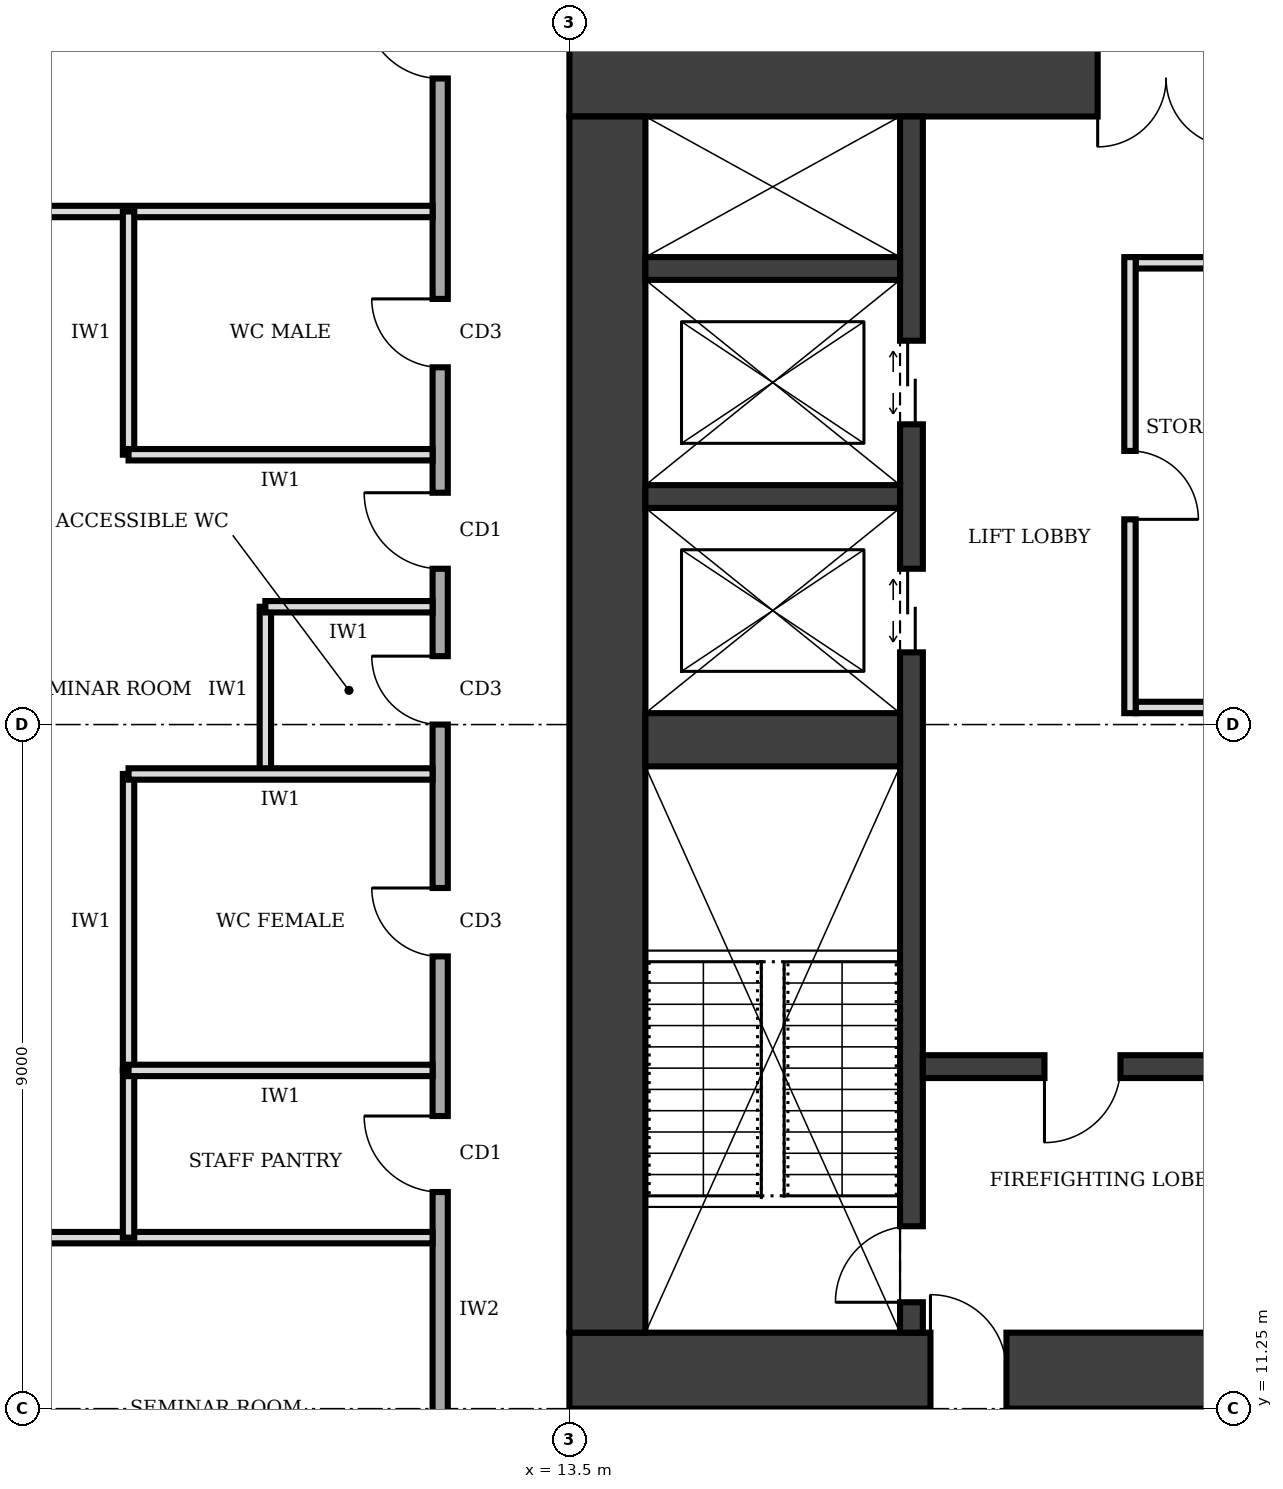
"""IFC4 building model, lengths in metres.
Left out: names, types, materials, properties, quantities, classifications, styles, units other than length and angle.
Written with IfcOpenShell. Run it as: python <this file> out.ifc"""

import sys

from ifc_helpers import new_model, si_unit, direction, frame, frame_2d, origin, place, context, subcontext, project, spatial, rectangle, extrude, element, fill, save


model = new_model("IFC4")
c1 = context("Model", 3, precision=1e-05, world=origin(), true_north=direction((0.0, 1.0)))
c2 = subcontext(c1, "Body", "Model", "MODEL_VIEW")
j1 = project(units=[si_unit("LENGTHUNIT", "METRE"), si_unit("PLANEANGLEUNIT", "RADIAN")], contexts=[c1])
p1 = place(None, origin())
s1 = spatial("IfcSite", under=j1, at=p1, CompositionType="ELEMENT")
p2 = place(p1, origin())
s2 = spatial("IfcBuilding", under=s1, at=p2, CompositionType="ELEMENT")
p3 = place(p2, frame((0.0, 0.0, 25.0)))
s3 = spatial("IfcBuildingStorey", under=s2, at=p3, CompositionType="ELEMENT", Elevation=25.0)
p4 = place(p3, frame((13.5, 11.75, 0.0), z_axis=(0.0, 0.0, 1.0), x_axis=(1.0, 0.0, 0.0)))
e1 = element("IfcWall", 1, at=p4, inside=s3, PredefinedType="SHEAR", context=c2, shape_type="SweptSolid", body=[
    extrude(rectangle(XDim=13.5, YDim=1.0, at=frame_2d((6.75, 0.0))), origin(), (0.0, 0.0, 1.0), 4.0),
])
p5 = place(p4, frame((4.75, 0.0, 0.0)))
e2 = element("IfcOpeningElement", 2, at=p5, cuts=e1, PredefinedType="OPENING", context=c2, shape_type="SweptSolid", body=[
    extrude(rectangle(XDim=1.0, YDim=2.1, at=frame_2d((0.5, 1.05))), frame((0.0, 0.51, 0.0), z_axis=(0.0, -1.0, 0.0), x_axis=(1.0, 0.0, 0.0)), (0.0, 0.0, 1.0), 1.02),
])
p6 = place(p3, frame((27.0, 28.75, 0.0), z_axis=(0.0, 0.0, 1.0), x_axis=(-1.0, 0.0, 0.0)))
e3 = element("IfcWall", 3, at=p6, inside=s3, PredefinedType="SHEAR", context=c2, shape_type="SweptSolid", body=[
    extrude(rectangle(XDim=13.5, YDim=1.0, at=frame_2d((6.75, 0.0))), origin(), (0.0, 0.0, 1.0), 4.0),
])
p7 = place(p6, frame((4.75, 0.0, 0.0)))
e4 = element("IfcOpeningElement", 4, at=p7, cuts=e3, PredefinedType="OPENING", context=c2, shape_type="SweptSolid", body=[
    extrude(rectangle(XDim=1.8, YDim=2.1, at=frame_2d((0.9, 1.05))), frame((0.0, 0.51, 0.0), z_axis=(0.0, -1.0, 0.0), x_axis=(1.0, 0.0, 0.0)), (0.0, 0.0, 1.0), 1.02),
])
p8 = place(p3, frame((14.0, 28.25, 0.0), z_axis=(0.0, 0.0, 1.0), x_axis=(0.0, -1.0, 0.0)))
e5 = element("IfcWall", 5, at=p8, inside=s3, PredefinedType="SHEAR", context=c2, shape_type="SweptSolid", body=[
    extrude(rectangle(XDim=16.0, YDim=1.0, at=frame_2d((8.0, 0.0))), origin(), (0.0, 0.0, 1.0), 4.0),
])
p9 = place(p3, frame((18.0, 12.25, 0.0), z_axis=(0.0, 0.0, 1.0), x_axis=(0.0, 1.0, 0.0)))
e6 = element("IfcWall", 6, at=p9, inside=s3, PredefinedType="SHEAR", context=c2, shape_type="SweptSolid", body=[
    extrude(rectangle(XDim=16.0, YDim=0.3, at=frame_2d((8.0, 0.0))), origin(), (0.0, 0.0, 1.0), 4.0),
])
p10 = place(p9, frame((0.4, 0.0, 0.0)))
e7 = element("IfcOpeningElement", 7, at=p10, cuts=e6, PredefinedType="OPENING", context=c2, shape_type="SweptSolid", body=[
    extrude(rectangle(XDim=1.0, YDim=2.1, at=frame_2d((0.5, 1.05))), frame((0.0, 0.16, 0.0), z_axis=(0.0, -1.0, 0.0), x_axis=(1.0, 0.0, 0.0)), (0.0, 0.0, 1.0), 0.32),
])
p11 = place(p9, frame((8.95, 0.0, 0.0)))
e8 = element("IfcOpeningElement", 8, at=p11, cuts=e6, PredefinedType="OPENING", context=c2, shape_type="SweptSolid", body=[
    extrude(rectangle(XDim=1.1, YDim=2.1, at=frame_2d((0.55, 1.05))), frame((0.0, 0.16, 0.0), z_axis=(0.0, -1.0, 0.0), x_axis=(1.0, 0.0, 0.0)), (0.0, 0.0, 1.0), 0.32),
])
p12 = place(p9, frame((11.95, 0.0, 0.0)))
e9 = element("IfcOpeningElement", 9, at=p12, cuts=e6, PredefinedType="OPENING", context=c2, shape_type="SweptSolid", body=[
    extrude(rectangle(XDim=1.1, YDim=2.1, at=frame_2d((0.55, 1.05))), frame((0.0, 0.16, 0.0), z_axis=(0.0, -1.0, 0.0), x_axis=(1.0, 0.0, 0.0)), (0.0, 0.0, 1.0), 0.32),
])
p13 = place(p3, frame((14.5, 20.05, 0.0), z_axis=(0.0, 0.0, 1.0), x_axis=(1.0, 0.0, 0.0)))
e10 = element("IfcWall", 10, at=p13, inside=s3, PredefinedType="SHEAR", context=c2, shape_type="SweptSolid", body=[
    extrude(rectangle(XDim=3.35, YDim=0.7, at=frame_2d((1.675, 0.0))), origin(), (0.0, 0.0, 1.0), 4.0),
])
p14 = place(p3, frame((18.15, 15.75, 0.0), z_axis=(0.0, 0.0, 1.0), x_axis=(1.0, 0.0, 0.0)))
e11 = element("IfcWall", 11, at=p14, inside=s3, PredefinedType="SHEAR", context=c2, shape_type="SweptSolid", body=[
    extrude(rectangle(XDim=4.2, YDim=0.3, at=frame_2d((2.1, 0.0))), origin(), (0.0, 0.0, 1.0), 4.0),
])
p15 = place(p14, frame((1.6, 0.0, 0.0)))
e12 = element("IfcOpeningElement", 12, at=p15, cuts=e11, PredefinedType="OPENING", context=c2, shape_type="SweptSolid", body=[
    extrude(rectangle(XDim=1.0, YDim=2.1, at=frame_2d((0.5, 1.05))), frame((0.0, 0.16, 0.0), z_axis=(0.0, -1.0, 0.0), x_axis=(1.0, 0.0, 0.0)), (0.0, 0.0, 1.0), 0.32),
])
for number, where, z_axis, x_axis in (
    (13, (14.5, 23.25, 0.0), (0.0, 0.0, 1.0), (1.0, 0.0, 0.0)),
    (14, (14.5, 26.25, 0.0), (0.0, 0.0, 1.0), (1.0, 0.0, 0.0)),
):
    element("IfcWall", number, at=place(p3, frame(where, z_axis=z_axis, x_axis=x_axis)), inside=s3, PredefinedType="SHEAR", context=c2, shape_type="SweptSolid", body=[
        extrude(rectangle(XDim=3.35, YDim=0.3, at=frame_2d((1.675, 0.0))), origin(), (0.0, 0.0, 1.0), 4.0),
    ])
p16 = place(p3, frame((20.875, 20.4, 0.0), z_axis=(0.0, 0.0, 1.0), x_axis=(0.0, 1.0, 0.0)))
e15 = element("IfcWall", 15, at=p16, inside=s3, PredefinedType="PARTITIONING", context=c2, shape_type="SweptSolid", body=[
    extrude(rectangle(XDim=6.0, YDim=0.15, at=frame_2d((3.0, 0.0))), origin(), (0.0, 0.0, 1.0), 3.75),
])
p17 = place(p16, frame((2.55, 0.0, 0.0)))
e16 = element("IfcOpeningElement", 16, at=p17, cuts=e15, PredefinedType="OPENING", context=c2, shape_type="SweptSolid", body=[
    extrude(rectangle(XDim=0.9, YDim=2.1, at=frame_2d((0.45, 1.05))), frame((0.0, 0.085, 0.0), z_axis=(0.0, -1.0, 0.0), x_axis=(1.0, 0.0, 0.0)), (0.0, 0.0, 1.0), 0.17),
])
for number, where, z_axis, x_axis in (
    (17, (20.95, 20.475, 0.0), (0.0, 0.0, 1.0), (1.0, 0.0, 0.0)),
    (18, (20.95, 26.325, 0.0), (0.0, 0.0, 1.0), (1.0, 0.0, 0.0)),
):
    element("IfcWall", number, at=place(p3, frame(where, z_axis=z_axis, x_axis=x_axis)), inside=s3, PredefinedType="PARTITIONING", context=c2, shape_type="SweptSolid", body=[
        extrude(rectangle(XDim=1.4, YDim=0.15, at=frame_2d((0.7, 0.0))), origin(), (0.0, 0.0, 1.0), 3.75),
    ])
p18 = place(p3, frame((11.8, 31.3, 0.0), z_axis=(0.0, 0.0, 1.0), x_axis=(0.0, -1.0, 0.0)))
e19 = element("IfcWall", 19, at=p18, inside=s3, PredefinedType="SOLIDWALL", context=c2, shape_type="SweptSolid", body=[
    extrude(rectangle(XDim=23.8, YDim=0.2, at=frame_2d((11.9, 0.0))), origin(), (0.0, 0.0, 1.0), 3.75),
])
p19 = place(p18, frame((20.3, 0.0, 0.0)))
e20 = element("IfcOpeningElement", 20, at=p19, cuts=e19, PredefinedType="OPENING", context=c2, shape_type="SweptSolid", body=[
    extrude(rectangle(XDim=1.0, YDim=2.1, at=frame_2d((0.5, 1.05))), frame((0.0, 0.11, 0.0), z_axis=(0.0, -1.0, 0.0), x_axis=(1.0, 0.0, 0.0)), (0.0, 0.0, 1.0), 0.22),
])
p20 = place(p18, frame((16.2, 0.0, 0.0)))
e21 = element("IfcOpeningElement", 21, at=p20, cuts=e19, PredefinedType="OPENING", context=c2, shape_type="SweptSolid", body=[
    extrude(rectangle(XDim=1.0, YDim=2.1, at=frame_2d((0.5, 1.05))), frame((0.0, 0.11, 0.0), z_axis=(0.0, -1.0, 0.0), x_axis=(1.0, 0.0, 0.0)), (0.0, 0.0, 1.0), 0.22),
])
p21 = place(p18, frame((13.2, 0.0, 0.0)))
e22 = element("IfcOpeningElement", 22, at=p21, cuts=e19, PredefinedType="OPENING", context=c2, shape_type="SweptSolid", body=[
    extrude(rectangle(XDim=0.9, YDim=2.1, at=frame_2d((0.45, 1.05))), frame((0.0, 0.11, 0.0), z_axis=(0.0, -1.0, 0.0), x_axis=(1.0, 0.0, 0.0)), (0.0, 0.0, 1.0), 0.22),
])
p22 = place(p18, frame((10.15, 0.0, 0.0)))
e23 = element("IfcOpeningElement", 23, at=p22, cuts=e19, PredefinedType="OPENING", context=c2, shape_type="SweptSolid", body=[
    extrude(rectangle(XDim=0.9, YDim=2.1, at=frame_2d((0.45, 1.05))), frame((0.0, 0.11, 0.0), z_axis=(0.0, -1.0, 0.0), x_axis=(1.0, 0.0, 0.0)), (0.0, 0.0, 1.0), 0.22),
])
p23 = place(p18, frame((5.45, 0.0, 0.0)))
e24 = element("IfcOpeningElement", 24, at=p23, cuts=e19, PredefinedType="OPENING", context=c2, shape_type="SweptSolid", body=[
    extrude(rectangle(XDim=0.9, YDim=2.1, at=frame_2d((0.45, 1.05))), frame((0.0, 0.11, 0.0), z_axis=(0.0, -1.0, 0.0), x_axis=(1.0, 0.0, 0.0)), (0.0, 0.0, 1.0), 0.22),
])
p24 = place(p18, frame((8.0, 0.0, 0.0)))
e25 = element("IfcOpeningElement", 25, at=p24, cuts=e19, PredefinedType="OPENING", context=c2, shape_type="SweptSolid", body=[
    extrude(rectangle(XDim=1.0, YDim=2.1, at=frame_2d((0.5, 1.05))), frame((0.0, 0.11, 0.0), z_axis=(0.0, -1.0, 0.0), x_axis=(1.0, 0.0, 0.0)), (0.0, 0.0, 1.0), 0.22),
])
p25 = place(p18, frame((1.55, 0.0, 0.0)))
e26 = element("IfcOpeningElement", 26, at=p25, cuts=e19, PredefinedType="OPENING", context=c2, shape_type="SweptSolid", body=[
    extrude(rectangle(XDim=1.0, YDim=2.1, at=frame_2d((0.5, 1.05))), frame((0.0, 0.11, 0.0), z_axis=(0.0, -1.0, 0.0), x_axis=(1.0, 0.0, 0.0)), (0.0, 0.0, 1.0), 0.22),
])
for number, where, z_axis, x_axis in (
    (27, (0.3, 13.5, 0.0), (0.0, 0.0, 1.0), (1.0, 0.0, 0.0)),
    (28, (0.3, 27.0, 0.0), (0.0, 0.0, 1.0), (1.0, 0.0, 0.0)),
):
    element("IfcWall", number, at=place(p3, frame(where, z_axis=z_axis, x_axis=x_axis)), inside=s3, PredefinedType="PARTITIONING", context=c2, shape_type="SweptSolid", body=[
        extrude(rectangle(XDim=11.4, YDim=0.15, at=frame_2d((5.7, 0.0))), origin(), (0.0, 0.0, 1.0), 3.75),
    ])
p26 = place(p3, frame((11.7, 15.7, 0.0), z_axis=(0.0, 0.0, 1.0), x_axis=(-1.0, 0.0, 0.0)))
e29 = element("IfcWall", 29, at=p26, inside=s3, PredefinedType="PARTITIONING", context=c2, shape_type="SweptSolid", body=[
    extrude(rectangle(XDim=4.0, YDim=0.15, at=frame_2d((2.0, 0.0))), origin(), (0.0, 0.0, 1.0), 3.75),
])
p27 = place(p3, frame((11.7, 19.6, 0.0), z_axis=(0.0, 0.0, 1.0), x_axis=(-1.0, 0.0, 0.0)))
e30 = element("IfcWall", 30, at=p27, inside=s3, PredefinedType="PARTITIONING", context=c2, shape_type="SweptSolid", body=[
    extrude(rectangle(XDim=4.0, YDim=0.15, at=frame_2d((2.0, 0.0))), origin(), (0.0, 0.0, 1.0), 2.85),
])
p28 = place(p3, frame((11.7, 21.8, 0.0), z_axis=(0.0, 0.0, 1.0), x_axis=(-1.0, 0.0, 0.0)))
e31 = element("IfcWall", 31, at=p28, inside=s3, PredefinedType="PARTITIONING", context=c2, shape_type="SweptSolid", body=[
    extrude(rectangle(XDim=2.2, YDim=0.15, at=frame_2d((1.1, 0.0))), origin(), (0.0, 0.0, 1.0), 3.75),
])
p29 = place(p3, frame((11.7, 23.8, 0.0), z_axis=(0.0, 0.0, 1.0), x_axis=(-1.0, 0.0, 0.0)))
e32 = element("IfcWall", 32, at=p29, inside=s3, PredefinedType="PARTITIONING", context=c2, shape_type="SweptSolid", body=[
    extrude(rectangle(XDim=4.0, YDim=0.15, at=frame_2d((2.0, 0.0))), origin(), (0.0, 0.0, 1.0), 3.75),
])
p30 = place(p3, frame((7.7, 13.5, 0.0), z_axis=(0.0, 0.0, 1.0), x_axis=(0.0, 1.0, 0.0)))
e33 = element("IfcWall", 33, at=p30, inside=s3, PredefinedType="PARTITIONING", context=c2, shape_type="SweptSolid", body=[
    extrude(rectangle(XDim=2.2, YDim=0.15, at=frame_2d((1.1, 0.0))), origin(), (0.0, 0.0, 1.0), 3.75),
])
p31 = place(p3, frame((7.7, 15.7, 0.0), z_axis=(0.0, 0.0, 1.0), x_axis=(0.0, 1.0, 0.0)))
e34 = element("IfcWall", 34, at=p31, inside=s3, PredefinedType="PARTITIONING", context=c2, shape_type="SweptSolid", body=[
    extrude(rectangle(XDim=3.9, YDim=0.15, at=frame_2d((1.95, 0.0))), origin(), (0.0, 0.0, 1.0), 3.75),
])
p32 = place(p3, frame((9.5, 19.6, 0.0), z_axis=(0.0, 0.0, 1.0), x_axis=(0.0, 1.0, 0.0)))
e35 = element("IfcWall", 35, at=p32, inside=s3, PredefinedType="PARTITIONING", context=c2, shape_type="SweptSolid", body=[
    extrude(rectangle(XDim=2.2, YDim=0.15, at=frame_2d((1.1, 0.0))), origin(), (0.0, 0.0, 1.0), 3.75),
])
p33 = place(p3, frame((7.7, 23.8, 0.0), z_axis=(0.0, 0.0, 1.0), x_axis=(0.0, 1.0, 0.0)))
e36 = element("IfcWall", 36, at=p33, inside=s3, PredefinedType="PARTITIONING", context=c2, shape_type="SweptSolid", body=[
    extrude(rectangle(XDim=3.2, YDim=0.15, at=frame_2d((1.6, 0.0))), origin(), (0.0, 0.0, 1.0), 3.75),
])
p34 = place(p5, origin())
e37 = element("IfcDoor", 37, at=p34, inside=s3, OperationType="SINGLE_SWING_LEFT", PredefinedType="DOOR", context=c2, shape_type="SweptSolid", body=[
    extrude(rectangle(XDim=1.0, YDim=2.1, at=frame_2d((0.5, 1.05))), frame((0.0, 0.025, 0.0), z_axis=(0.0, -1.0, 0.0), x_axis=(1.0, 0.0, 0.0)), (0.0, 0.0, 1.0), 0.05),
])
fill(e2, e37)
p35 = place(p7, origin())
e38 = element("IfcDoor", 38, at=p35, inside=s3, OperationType="DOUBLE_DOOR_SINGLE_SWING", PredefinedType="DOOR", context=c2, shape_type="SweptSolid", body=[
    extrude(rectangle(XDim=1.8, YDim=2.1, at=frame_2d((0.9, 1.05))), frame((0.0, 0.025, 0.0), z_axis=(0.0, -1.0, 0.0), x_axis=(1.0, 0.0, 0.0)), (0.0, 0.0, 1.0), 0.05),
])
fill(e4, e38)
p36 = place(p15, frame((1.0, 0.0, 0.0), z_axis=(0.0, 0.0, 1.0), x_axis=(-1.0, 0.0, 0.0)))
e39 = element("IfcDoor", 39, at=p36, inside=s3, OperationType="SINGLE_SWING_RIGHT", PredefinedType="DOOR", context=c2, shape_type="SweptSolid", body=[
    extrude(rectangle(XDim=1.0, YDim=2.1, at=frame_2d((0.5, 1.05))), frame((0.0, 0.025, 0.0), z_axis=(0.0, -1.0, 0.0), x_axis=(1.0, 0.0, 0.0)), (0.0, 0.0, 1.0), 0.05),
])
fill(e12, e39)
p37 = place(p10, origin())
e40 = element("IfcDoor", 40, at=p37, inside=s3, OperationType="SINGLE_SWING_LEFT", PredefinedType="DOOR", context=c2, shape_type="SweptSolid", body=[
    extrude(rectangle(XDim=1.0, YDim=2.1, at=frame_2d((0.5, 1.05))), frame((0.0, 0.025, 0.0), z_axis=(0.0, -1.0, 0.0), x_axis=(1.0, 0.0, 0.0)), (0.0, 0.0, 1.0), 0.05),
])
fill(e7, e40)
p38 = place(p11, origin())
e41 = element("IfcDoor", 41, at=p38, inside=s3, OperationType="DOUBLE_DOOR_SLIDING", PredefinedType="DOOR", context=c2, shape_type="SweptSolid", body=[
    extrude(rectangle(XDim=1.1, YDim=2.1, at=frame_2d((0.55, 1.05))), frame((0.0, 0.025, 0.0), z_axis=(0.0, -1.0, 0.0), x_axis=(1.0, 0.0, 0.0)), (0.0, 0.0, 1.0), 0.05),
])
fill(e8, e41)
p39 = place(p12, origin())
e42 = element("IfcDoor", 42, at=p39, inside=s3, OperationType="DOUBLE_DOOR_SLIDING", PredefinedType="DOOR", context=c2, shape_type="SweptSolid", body=[
    extrude(rectangle(XDim=1.1, YDim=2.1, at=frame_2d((0.55, 1.05))), frame((0.0, 0.025, 0.0), z_axis=(0.0, -1.0, 0.0), x_axis=(1.0, 0.0, 0.0)), (0.0, 0.0, 1.0), 0.05),
])
fill(e9, e42)
p40 = place(p17, frame((0.9, 0.0, 0.0), z_axis=(0.0, 0.0, 1.0), x_axis=(-1.0, 0.0, 0.0)))
e43 = element("IfcDoor", 43, at=p40, inside=s3, OperationType="SINGLE_SWING_RIGHT", PredefinedType="DOOR", context=c2, shape_type="SweptSolid", body=[
    extrude(rectangle(XDim=0.9, YDim=2.1, at=frame_2d((0.45, 1.05))), frame((0.0, 0.025, 0.0), z_axis=(0.0, -1.0, 0.0), x_axis=(1.0, 0.0, 0.0)), (0.0, 0.0, 1.0), 0.05),
])
fill(e16, e43)
p41 = place(p20, frame((1.0, 0.0, 0.0), z_axis=(0.0, 0.0, 1.0), x_axis=(-1.0, 0.0, 0.0)))
e44 = element("IfcDoor", 44, at=p41, inside=s3, OperationType="SINGLE_SWING_RIGHT", PredefinedType="DOOR", context=c2, shape_type="SweptSolid", body=[
    extrude(rectangle(XDim=1.0, YDim=2.1, at=frame_2d((0.5, 1.05))), frame((0.0, 0.025, 0.0), z_axis=(0.0, -1.0, 0.0), x_axis=(1.0, 0.0, 0.0)), (0.0, 0.0, 1.0), 0.05),
])
fill(e21, e44)
p42 = place(p21, frame((0.9, 0.0, 0.0), z_axis=(0.0, 0.0, 1.0), x_axis=(-1.0, 0.0, 0.0)))
e45 = element("IfcDoor", 45, at=p42, inside=s3, OperationType="SINGLE_SWING_RIGHT", PredefinedType="DOOR", context=c2, shape_type="SweptSolid", body=[
    extrude(rectangle(XDim=0.9, YDim=2.1, at=frame_2d((0.45, 1.05))), frame((0.0, 0.025, 0.0), z_axis=(0.0, -1.0, 0.0), x_axis=(1.0, 0.0, 0.0)), (0.0, 0.0, 1.0), 0.05),
])
fill(e22, e45)
p43 = place(p22, frame((0.9, 0.0, 0.0), z_axis=(0.0, 0.0, 1.0), x_axis=(-1.0, 0.0, 0.0)))
e46 = element("IfcDoor", 46, at=p43, inside=s3, OperationType="SINGLE_SWING_RIGHT", PredefinedType="DOOR", context=c2, shape_type="SweptSolid", body=[
    extrude(rectangle(XDim=0.9, YDim=2.1, at=frame_2d((0.45, 1.05))), frame((0.0, 0.025, 0.0), z_axis=(0.0, -1.0, 0.0), x_axis=(1.0, 0.0, 0.0)), (0.0, 0.0, 1.0), 0.05),
])
fill(e23, e46)
p44 = place(p23, frame((0.9, 0.0, 0.0), z_axis=(0.0, 0.0, 1.0), x_axis=(-1.0, 0.0, 0.0)))
e47 = element("IfcDoor", 47, at=p44, inside=s3, OperationType="SINGLE_SWING_RIGHT", PredefinedType="DOOR", context=c2, shape_type="SweptSolid", body=[
    extrude(rectangle(XDim=0.9, YDim=2.1, at=frame_2d((0.45, 1.05))), frame((0.0, 0.025, 0.0), z_axis=(0.0, -1.0, 0.0), x_axis=(1.0, 0.0, 0.0)), (0.0, 0.0, 1.0), 0.05),
])
fill(e24, e47)
p45 = place(p24, frame((1.0, 0.0, 0.0), z_axis=(0.0, 0.0, 1.0), x_axis=(-1.0, 0.0, 0.0)))
e48 = element("IfcDoor", 48, at=p45, inside=s3, OperationType="SINGLE_SWING_RIGHT", PredefinedType="DOOR", context=c2, shape_type="SweptSolid", body=[
    extrude(rectangle(XDim=1.0, YDim=2.1, at=frame_2d((0.5, 1.05))), frame((0.0, 0.025, 0.0), z_axis=(0.0, -1.0, 0.0), x_axis=(1.0, 0.0, 0.0)), (0.0, 0.0, 1.0), 0.05),
])
fill(e25, e48)
p46 = place(p25, frame((1.0, 0.0, 0.0), z_axis=(0.0, 0.0, 1.0), x_axis=(-1.0, 0.0, 0.0)))
e49 = element("IfcDoor", 49, at=p46, inside=s3, OperationType="SINGLE_SWING_RIGHT", PredefinedType="DOOR", context=c2, shape_type="SweptSolid", body=[
    extrude(rectangle(XDim=1.0, YDim=2.1, at=frame_2d((0.5, 1.05))), frame((0.0, 0.025, 0.0), z_axis=(0.0, -1.0, 0.0), x_axis=(1.0, 0.0, 0.0)), (0.0, 0.0, 1.0), 0.05),
])
fill(e26, e49)
save(model, sys.argv[1])
